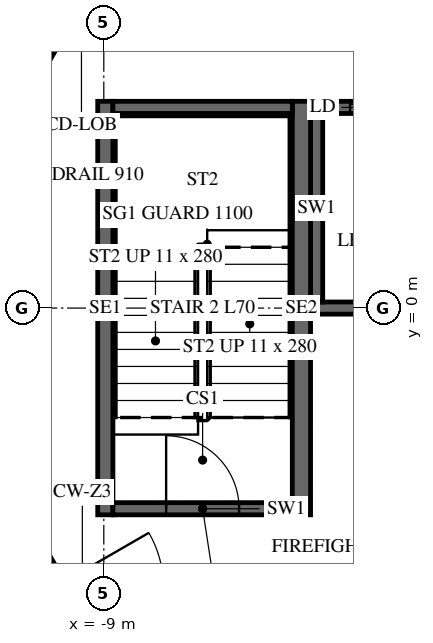
"""IFC4 building model, lengths in metres.
Left out: names, types, materials, properties, quantities, classifications, styles, units other than length and angle.
Written with IfcOpenShell. Run it as: python <this file> out.ifc"""

import sys

from ifc_helpers import new_model, si_unit, direction, frame, frame_2d, origin, place, context, subcontext, project, spatial, polyline, rectangle, outline, extrude, element, fill, save


model = new_model("IFC4")
c1 = context("Model", 3, precision=1e-05, world=origin(), true_north=direction((0.0, 1.0)))
c2 = subcontext(c1, "Body", "Model", "MODEL_VIEW")
j1 = project(units=[si_unit("LENGTHUNIT", "METRE"), si_unit("PLANEANGLEUNIT", "RADIAN")], contexts=[c1])
p1 = place(None, origin())
s1 = spatial("IfcSite", under=j1, at=p1, CompositionType="ELEMENT")
p2 = place(p1, origin())
s2 = spatial("IfcBuilding", under=s1, at=p2, CompositionType="ELEMENT")
p3 = place(p2, frame((0.0, 0.0, 291.3)))
s3 = spatial("IfcBuildingStorey", under=s2, at=p3, CompositionType="ELEMENT", Elevation=291.3)
p4 = place(p3, frame((-6.235, 10.8, -0.15), z_axis=(0.0, 0.0, 1.0), x_axis=(-0.499996419489, -0.866027470984, 0.0)))
e1 = element("IfcWall", 1, at=p4, inside=s3, PredefinedType="SHEAR", context=c2, shape_type="SweptSolid", body=[
    extrude(outline(polyline([(-0.115, -0.2), (12.586, -0.2), (12.355, 0.2), (0.115, 0.2), (-0.115, -0.2)])), origin(), (0.0, 0.0, 1.0), 3.9),
])
p5 = place(p4, frame((5.364, 0.0, 0.15)))
e2 = element("IfcOpeningElement", 2, at=p5, cuts=e1, PredefinedType="OPENING", context=c2, shape_type="SweptSolid", body=[
    extrude(rectangle(XDim=1.8, YDim=2.4, at=frame_2d((0.9, 1.2))), frame((0.0, 0.21, 0.0), z_axis=(0.0, -1.0, 0.0), x_axis=(1.0, 0.0, 0.0)), (0.0, 0.0, 1.0), 0.42),
])
p6 = place(p3, frame((-12.471, 0.0, -0.15), z_axis=(0.0, 0.0, 1.0), x_axis=(0.499996419489, -0.866027470984, 0.0)))
e3 = element("IfcWall", 3, at=p6, inside=s3, PredefinedType="SHEAR", context=c2, shape_type="SweptSolid", body=[
    extrude(outline(polyline([(-0.115, -0.2), (12.586, -0.2), (12.355, 0.2), (0.115, 0.2), (-0.115, -0.2)])), origin(), (0.0, 0.0, 1.0), 3.9),
])
p7 = place(p6, frame((5.306, 0.0, 0.15)))
e4 = element("IfcOpeningElement", 4, at=p7, cuts=e3, PredefinedType="OPENING", context=c2, shape_type="SweptSolid", body=[
    extrude(rectangle(XDim=1.8, YDim=2.4, at=frame_2d((0.9, 1.2))), frame((0.0, 0.21, 0.0), z_axis=(0.0, -1.0, 0.0), x_axis=(1.0, 0.0, 0.0)), (0.0, 0.0, 1.0), 0.42),
])
p8 = place(p3, frame((-5.6, 3.3, -0.25), z_axis=(0.0, 0.0, 1.0), x_axis=(1.0, 0.0, 0.0)))
e5 = element("IfcWall", 5, at=p8, inside=s3, PredefinedType="SHEAR", context=c2, shape_type="SweptSolid", body=[
    extrude(rectangle(XDim=6.6, YDim=0.2, at=frame_2d((3.3, 0.0))), origin(), (0.0, 0.0, 1.0), 3.9),
])
p9 = place(p8, frame((0.65, 0.0, 0.25)))
e6 = element("IfcOpeningElement", 6, at=p9, cuts=e5, PredefinedType="OPENING", context=c2, shape_type="SweptSolid", body=[
    extrude(rectangle(XDim=1.1, YDim=2.1, at=frame_2d((0.55, 1.05))), frame((0.0, 0.11, 0.0), z_axis=(0.0, -1.0, 0.0), x_axis=(1.0, 0.0, 0.0)), (0.0, 0.0, 1.0), 0.22),
])
p10 = place(p8, frame((2.85, 0.0, 0.25)))
e7 = element("IfcOpeningElement", 7, at=p10, cuts=e5, PredefinedType="OPENING", context=c2, shape_type="SweptSolid", body=[
    extrude(rectangle(XDim=1.1, YDim=2.1, at=frame_2d((0.55, 1.05))), frame((0.0, 0.11, 0.0), z_axis=(0.0, -1.0, 0.0), x_axis=(1.0, 0.0, 0.0)), (0.0, 0.0, 1.0), 0.22),
])
p11 = place(p8, frame((5.05, 0.0, 0.25)))
e8 = element("IfcOpeningElement", 8, at=p11, cuts=e5, PredefinedType="OPENING", context=c2, shape_type="SweptSolid", body=[
    extrude(rectangle(XDim=1.1, YDim=2.1, at=frame_2d((0.55, 1.05))), frame((0.0, 0.11, 0.0), z_axis=(0.0, -1.0, 0.0), x_axis=(1.0, 0.0, 0.0)), (0.0, 0.0, 1.0), 0.22),
])
p12 = place(p3, frame((-5.6, 0.0, -0.25), z_axis=(0.0, 0.0, 1.0), x_axis=(1.0, 0.0, 0.0)))
e9 = element("IfcWall", 9, at=p12, inside=s3, PredefinedType="SHEAR", context=c2, shape_type="SweptSolid", body=[
    extrude(rectangle(XDim=11.2, YDim=0.2, at=frame_2d((5.6, 0.0))), origin(), (0.0, 0.0, 1.0), 3.9),
])
p13 = place(p3, frame((-5.5, 0.1, -0.25), z_axis=(0.0, 0.0, 1.0), x_axis=(0.0, 1.0, 0.0)))
e10 = element("IfcWall", 10, at=p13, inside=s3, PredefinedType="SHEAR", context=c2, shape_type="SweptSolid", body=[
    extrude(rectangle(XDim=3.1, YDim=0.2, at=frame_2d((1.55, 0.0))), origin(), (0.0, 0.0, 1.0), 3.9),
])
p14 = place(p3, frame((-5.75, -3.4, -0.25), z_axis=(0.0, 0.0, 1.0), x_axis=(0.0, 1.0, 0.0)))
e11 = element("IfcWall", 11, at=p14, inside=s3, PredefinedType="SHEAR", context=c2, shape_type="SweptSolid", body=[
    extrude(rectangle(XDim=6.8, YDim=0.3, at=frame_2d((3.4, 0.0))), origin(), (0.0, 0.0, 1.0), 3.9),
])
p15 = place(p3, frame((-8.975, -3.4, -0.25), z_axis=(0.0, 0.0, 1.0), x_axis=(0.0, 1.0, 0.0)))
e12 = element("IfcWall", 12, at=p15, inside=s3, PredefinedType="SHEAR", context=c2, shape_type="SweptSolid", body=[
    extrude(rectangle(XDim=6.8, YDim=0.25, at=frame_2d((3.4, 0.0))), origin(), (0.0, 0.0, 1.0), 3.9),
])
p16 = place(p3, frame((-8.85, 3.3, -0.25), z_axis=(0.0, 0.0, 1.0), x_axis=(1.0, 0.0, 0.0)))
e13 = element("IfcWall", 13, at=p16, inside=s3, PredefinedType="SHEAR", context=c2, shape_type="SweptSolid", body=[
    extrude(rectangle(XDim=2.95, YDim=0.2, at=frame_2d((1.475, 0.0))), origin(), (0.0, 0.0, 1.0), 3.9),
])
p17 = place(p3, frame((-8.85, -3.3, -0.25), z_axis=(0.0, 0.0, 1.0), x_axis=(1.0, 0.0, 0.0)))
e14 = element("IfcWall", 14, at=p17, inside=s3, PredefinedType="SHEAR", context=c2, shape_type="SweptSolid", body=[
    extrude(rectangle(XDim=2.95, YDim=0.2, at=frame_2d((1.475, 0.0))), origin(), (0.0, 0.0, 1.0), 3.9),
])
p18 = place(p17, frame((0.875, 0.0, 0.25)))
e15 = element("IfcOpeningElement", 15, at=p18, cuts=e14, PredefinedType="OPENING", context=c2, shape_type="SweptSolid", body=[
    extrude(rectangle(XDim=1.2, YDim=2.4, at=frame_2d((0.6, 1.2))), frame((0.0, 0.11, 0.0), z_axis=(0.0, -1.0, 0.0), x_axis=(1.0, 0.0, 0.0)), (0.0, 0.0, 1.0), 0.22),
])
p19 = place(p3, frame((-8.434, 16.925, 0.0), z_axis=(0.0, 0.0, 1.0), x_axis=(-0.438371383278, -0.898793930956, 0.0)))
e16 = element("IfcWall", 16, at=p19, inside=s3, PredefinedType="PARTITIONING", context=c2, shape_type="SweptSolid", body=[
    extrude(rectangle(XDim=16.939, YDim=0.15, at=frame_2d((8.47, 0.0))), origin(), (0.0, 0.0, 1.0), 2.988),
])
p20 = place(p19, frame((3.142, 0.0, 0.0)))
e17 = element("IfcOpeningElement", 17, at=p20, cuts=e16, PredefinedType="OPENING", context=c2, shape_type="SweptSolid", body=[
    extrude(rectangle(XDim=1.0, YDim=2.1, at=frame_2d((0.5, 1.05))), frame((0.0, 0.085, 0.0), z_axis=(0.0, -1.0, 0.0), x_axis=(1.0, 0.0, 0.0)), (0.0, 0.0, 1.0), 0.17),
])
p21 = place(p19, frame((15.39, 0.0, 0.0)))
e18 = element("IfcOpeningElement", 18, at=p21, cuts=e16, PredefinedType="OPENING", context=c2, shape_type="SweptSolid", body=[
    extrude(rectangle(XDim=1.0, YDim=2.1, at=frame_2d((0.5, 1.05))), frame((0.0, 0.085, 0.0), z_axis=(0.0, -1.0, 0.0), x_axis=(1.0, 0.0, 0.0)), (0.0, 0.0, 1.0), 0.17),
])
p22 = place(p18, origin())
e19 = element("IfcDoor", 19, at=p22, inside=s3, OperationType="SINGLE_SWING_LEFT", PredefinedType="DOOR", context=c2, shape_type="SweptSolid", body=[
    extrude(rectangle(XDim=1.2, YDim=2.4, at=frame_2d((0.6, 1.2))), frame((0.0, 0.025, 0.0), z_axis=(0.0, -1.0, 0.0), x_axis=(1.0, 0.0, 0.0)), (0.0, 0.0, 1.0), 0.05),
])
fill(e15, e19)
p23 = place(p9, origin())
e20 = element("IfcDoor", 20, at=p23, inside=s3, OperationType="SLIDING_TO_LEFT", PredefinedType="DOOR", context=c2, shape_type="SweptSolid", body=[
    extrude(rectangle(XDim=1.1, YDim=2.1, at=frame_2d((0.55, 1.05))), frame((0.0, 0.025, 0.0), z_axis=(0.0, -1.0, 0.0), x_axis=(1.0, 0.0, 0.0)), (0.0, 0.0, 1.0), 0.05),
])
fill(e6, e20)
save(model, sys.argv[1])
